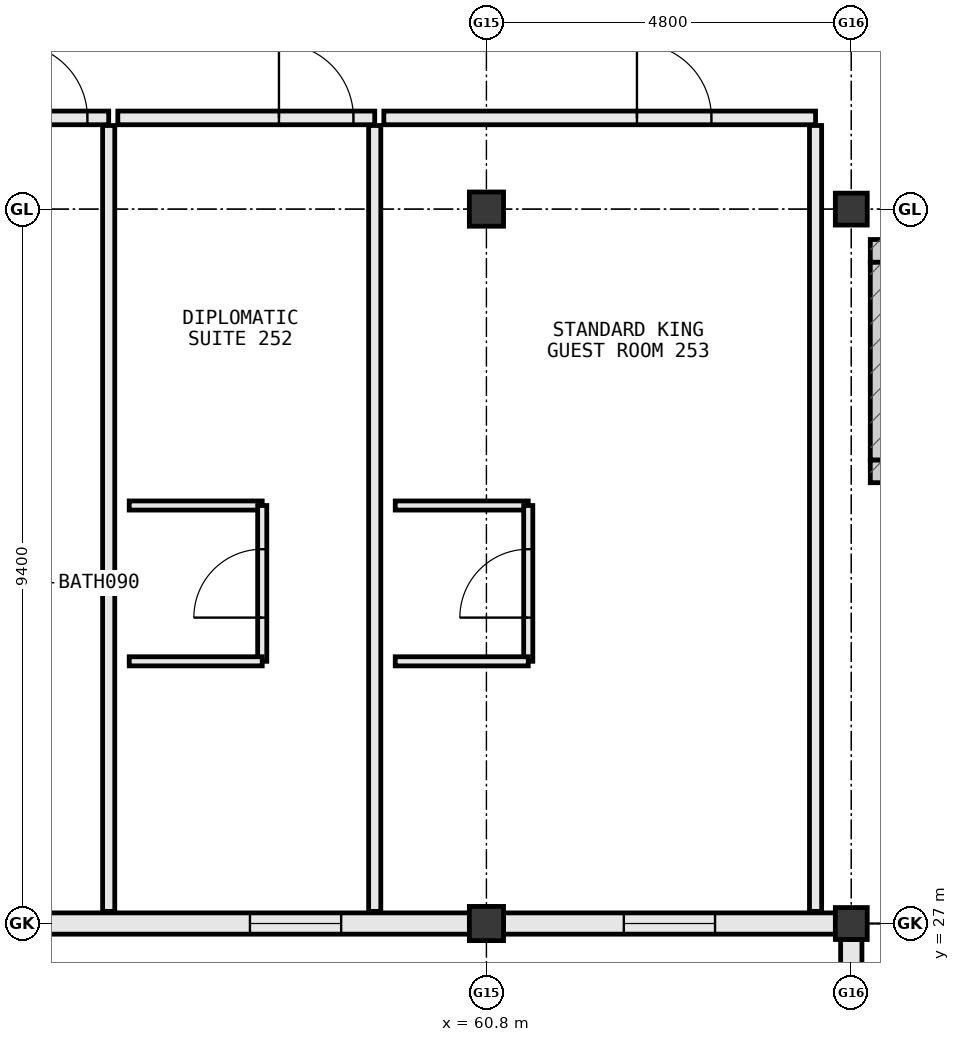
"""IFC4 building model, lengths in metres.
Left out: names, types, materials, properties, quantities, classifications, styles, units other than length and angle.
Written with IfcOpenShell. Run it as: python <this file> out.ifc"""

import sys

from ifc_helpers import new_model, si_unit, direction, frame, frame_2d, origin, origin_2d, place, context, subcontext, project, spatial, rectangle, extrude, element, fill, save


model = new_model("IFC4")
c1 = context("Model", 3, precision=1e-05, world=origin(), true_north=direction((0.0, 1.0)))
c2 = subcontext(c1, "Body", "Model", "MODEL_VIEW")
j1 = project(units=[si_unit("LENGTHUNIT", "METRE"), si_unit("PLANEANGLEUNIT", "RADIAN")], contexts=[c1])
p1 = place(None, origin())
s1 = spatial("IfcSite", under=j1, at=p1, CompositionType="ELEMENT")
p2 = place(p1, origin())
s2 = spatial("IfcBuilding", under=s1, at=p2, CompositionType="ELEMENT")
p3 = place(p2, frame((0.0, 0.0, 35.2)))
s3 = spatial("IfcBuildingStorey", under=s2, at=p3, CompositionType="ELEMENT", Elevation=35.2)
for number, where, z_axis, x_axis in (
    (1, (60.8, 27.0, 0.0), (0.0, 0.0, 1.0), (1.0, 0.0, 0.0)),
    (2, (60.8, 36.4, 0.0), (0.0, 0.0, 1.0), (1.0, 0.0, 0.0)),
):
    element("IfcColumn", number, at=place(p3, frame(where, z_axis=z_axis, x_axis=x_axis)), inside=s3, PredefinedType="COLUMN", context=c2, shape_type="SweptSolid", body=[
        extrude(rectangle(XDim=0.45, YDim=0.45, at=origin_2d()), origin(), (0.0, 0.0, 1.0), 3.8),
    ])
for number, where, z_axis, x_axis in (
    (3, (65.6, 27.0, 0.0), (0.0, 0.0, 1.0), (1.0, 0.0, 0.0)),
    (4, (65.6, 36.4, 0.0), (0.0, 0.0, 1.0), (1.0, 0.0, 0.0)),
):
    element("IfcColumn", number, at=place(p3, frame(where, z_axis=z_axis, x_axis=x_axis)), inside=s3, PredefinedType="COLUMN", context=c2, shape_type="SweptSolid", body=[
        extrude(rectangle(XDim=0.42, YDim=0.42, at=origin_2d()), origin(), (0.0, 0.0, 1.0), 3.8),
    ])
p4 = place(p3, frame((51.423, 27.0, 0.0), z_axis=(0.0, 0.0, 1.0), x_axis=(1.0, 0.0, 0.0)))
e5 = element("IfcWall", 5, at=p4, inside=s3, PredefinedType="STANDARD", context=c2, shape_type="SweptSolid", body=[
    extrude(rectangle(XDim=9.154, YDim=0.28, at=frame_2d((4.577, 0.0))), origin(), (0.0, 0.0, 1.0), 2.84),
])
p5 = place(p4, frame((1.688, 0.0, 0.85)))
e6 = element("IfcOpeningElement", 6, at=p5, cuts=e5, PredefinedType="OPENING", context=c2, shape_type="SweptSolid", body=[
    extrude(rectangle(XDim=1.2, YDim=1.55, at=frame_2d((0.6, 0.775))), frame((0.0, 0.152, 0.0), z_axis=(0.0, -1.0, 0.0), x_axis=(1.0, 0.0, 0.0)), (0.0, 0.0, 1.0), 0.304),
])
p6 = place(p4, frame((6.265, 0.0, 0.85)))
e7 = element("IfcOpeningElement", 7, at=p6, cuts=e5, PredefinedType="OPENING", context=c2, shape_type="SweptSolid", body=[
    extrude(rectangle(XDim=1.2, YDim=1.55, at=frame_2d((0.6, 0.775))), frame((0.0, 0.152, 0.0), z_axis=(0.0, -1.0, 0.0), x_axis=(1.0, 0.0, 0.0)), (0.0, 0.0, 1.0), 0.304),
])
p7 = place(p3, frame((61.023, 27.0, 0.0), z_axis=(0.0, 0.0, 1.0), x_axis=(1.0, 0.0, 0.0)))
e8 = element("IfcWall", 8, at=p7, inside=s3, PredefinedType="STANDARD", context=c2, shape_type="SweptSolid", body=[
    extrude(rectangle(XDim=4.369, YDim=0.28, at=frame_2d((2.185, 0.0))), origin(), (0.0, 0.0, 1.0), 3.02),
])
p8 = place(p7, frame((1.584, 0.0, 0.85)))
e9 = element("IfcOpeningElement", 9, at=p8, cuts=e8, PredefinedType="OPENING", context=c2, shape_type="SweptSolid", body=[
    extrude(rectangle(XDim=1.2, YDim=1.55, at=frame_2d((0.6, 0.775))), frame((0.0, 0.152, 0.0), z_axis=(0.0, -1.0, 0.0), x_axis=(1.0, 0.0, 0.0)), (0.0, 0.0, 1.0), 0.304),
])
p9 = place(p3, frame((65.6, 26.792, 0.0), z_axis=(0.0, 0.0, 1.0), x_axis=(0.0, -1.0, 0.0)))
e10 = element("IfcWall", 10, at=p9, inside=s3, PredefinedType="STANDARD", context=c2, shape_type="SweptSolid", body=[
    extrude(rectangle(XDim=7.984, YDim=0.28, at=frame_2d((3.992, 0.0))), origin(), (0.0, 0.0, 1.0), 3.02),
])
p10 = place(p9, frame((3.467, 0.0, 0.85)))
e11 = element("IfcOpeningElement", 11, at=p10, cuts=e10, PredefinedType="OPENING", context=c2, shape_type="SweptSolid", body=[
    extrude(rectangle(XDim=1.05, YDim=1.45, at=frame_2d((0.525, 0.725))), frame((0.0, 0.152, 0.0), z_axis=(0.0, -1.0, 0.0), x_axis=(1.0, 0.0, 0.0)), (0.0, 0.0, 1.0), 0.304),
])
p11 = place(p3, frame((65.85, 32.95, 0.0), z_axis=(0.0, 0.0, 1.0), x_axis=(1.0, 0.0, 0.0)))
e12 = element("IfcWall", 12, at=p11, inside=s3, PredefinedType="SHEAR", context=c2, shape_type="SweptSolid", body=[
    extrude(rectangle(XDim=2.9, YDim=0.3, at=frame_2d((1.45, 0.0))), origin(), (0.0, 0.0, 1.0), 3.8),
])
p12 = place(p11, frame((0.85, 0.0, 0.0)))
e13 = element("IfcOpeningElement", 13, at=p12, cuts=e12, PredefinedType="OPENING", context=c2, shape_type="SweptSolid", body=[
    extrude(rectangle(XDim=1.2, YDim=2.2, at=frame_2d((0.6, 1.1))), frame((0.0, 0.162, 0.0), z_axis=(0.0, -1.0, 0.0), x_axis=(1.0, 0.0, 0.0)), (0.0, 0.0, 1.0), 0.324),
])
p13 = place(p3, frame((68.75, 35.85, 0.0), z_axis=(0.0, 0.0, 1.0), x_axis=(-1.0, 0.0, 0.0)))
e14 = element("IfcWall", 14, at=p13, inside=s3, PredefinedType="SHEAR", context=c2, shape_type="SweptSolid", body=[
    extrude(rectangle(XDim=2.9, YDim=0.3, at=frame_2d((1.45, 0.0))), origin(), (0.0, 0.0, 1.0), 3.8),
])
p14 = place(p3, frame((66.0, 35.7, 0.0), z_axis=(0.0, 0.0, 1.0), x_axis=(0.0, -1.0, 0.0)))
e15 = element("IfcWall", 15, at=p14, inside=s3, PredefinedType="SHEAR", context=c2, shape_type="SweptSolid", body=[
    extrude(rectangle(XDim=2.6, YDim=0.3, at=frame_2d((1.3, 0.0))), origin(), (0.0, 0.0, 1.0), 3.8),
])
p15 = place(p3, frame((55.83, 37.6, 0.0), z_axis=(0.0, 0.0, 1.0), x_axis=(-1.0, 0.0, 0.0)))
e16 = element("IfcWall", 16, at=p15, inside=s3, PredefinedType="PARTITIONING", context=c2, shape_type="SweptSolid", body=[
    extrude(rectangle(XDim=3.38, YDim=0.18, at=frame_2d((1.69, 0.0))), origin(), (0.0, 0.0, 1.0), 3.565),
])
p16 = place(p15, frame((0.28, 0.0, 0.0)))
e17 = element("IfcOpeningElement", 17, at=p16, cuts=e16, PredefinedType="OPENING", context=c2, shape_type="SweptSolid", body=[
    extrude(rectangle(XDim=0.98, YDim=2.18, at=frame_2d((0.49, 1.09))), frame((0.0, 0.102, 0.0), z_axis=(0.0, -1.0, 0.0), x_axis=(1.0, 0.0, 0.0)), (0.0, 0.0, 1.0), 0.204),
])
p17 = place(p3, frame((55.83, 27.16, 0.0), z_axis=(0.0, 0.0, 1.0), x_axis=(0.0, 1.0, 0.0)))
e18 = element("IfcWall", 18, at=p17, inside=s3, PredefinedType="PARTITIONING", context=c2, shape_type="SweptSolid", body=[
    extrude(rectangle(XDim=10.34, YDim=0.16, at=frame_2d((5.17, 0.0))), origin(), (0.0, 0.0, 1.0), 3.565),
])
p18 = place(p3, frame((59.33, 37.6, 0.0), z_axis=(0.0, 0.0, 1.0), x_axis=(-1.0, 0.0, 0.0)))
e19 = element("IfcWall", 19, at=p18, inside=s3, PredefinedType="PARTITIONING", context=c2, shape_type="SweptSolid", body=[
    extrude(rectangle(XDim=3.38, YDim=0.18, at=frame_2d((1.69, 0.0))), origin(), (0.0, 0.0, 1.0), 3.565),
])
p19 = place(p18, frame((0.28, 0.0, 0.0)))
e20 = element("IfcOpeningElement", 20, at=p19, cuts=e19, PredefinedType="OPENING", context=c2, shape_type="SweptSolid", body=[
    extrude(rectangle(XDim=0.98, YDim=2.18, at=frame_2d((0.49, 1.09))), frame((0.0, 0.102, 0.0), z_axis=(0.0, -1.0, 0.0), x_axis=(1.0, 0.0, 0.0)), (0.0, 0.0, 1.0), 0.204),
])
p20 = place(p3, frame((59.33, 27.16, 0.0), z_axis=(0.0, 0.0, 1.0), x_axis=(0.0, 1.0, 0.0)))
e21 = element("IfcWall", 21, at=p20, inside=s3, PredefinedType="PARTITIONING", context=c2, shape_type="SweptSolid", body=[
    extrude(rectangle(XDim=10.34, YDim=0.16, at=frame_2d((5.17, 0.0))), origin(), (0.0, 0.0, 1.0), 3.565),
])
p21 = place(p3, frame((56.1, 32.5, 0.0), z_axis=(0.0, 0.0, 1.0), x_axis=(1.0, 0.0, 0.0)))
e22 = element("IfcWall", 22, at=p21, inside=s3, PredefinedType="PARTITIONING", context=c2, shape_type="SweptSolid", body=[
    extrude(rectangle(XDim=1.75, YDim=0.12, at=frame_2d((0.875, 0.0))), origin(), (0.0, 0.0, 1.0), 3.565),
])
p22 = place(p3, frame((57.85, 30.45, 0.0), z_axis=(0.0, 0.0, 1.0), x_axis=(0.0, 1.0, 0.0)))
e23 = element("IfcWall", 23, at=p22, inside=s3, PredefinedType="PARTITIONING", context=c2, shape_type="SweptSolid", body=[
    extrude(rectangle(XDim=2.05, YDim=0.12, at=frame_2d((1.025, 0.0))), origin(), (0.0, 0.0, 1.0), 3.11),
])
p23 = place(p22, frame((0.575, 0.0, 0.0)))
e24 = element("IfcOpeningElement", 24, at=p23, cuts=e23, PredefinedType="OPENING", context=c2, shape_type="SweptSolid", body=[
    extrude(rectangle(XDim=0.9, YDim=2.15, at=frame_2d((0.45, 1.075))), frame((0.0, 0.072, 0.0), z_axis=(0.0, -1.0, 0.0), x_axis=(1.0, 0.0, 0.0)), (0.0, 0.0, 1.0), 0.144),
])
p24 = place(p3, frame((56.1, 30.45, 0.0), z_axis=(0.0, 0.0, 1.0), x_axis=(1.0, 0.0, 0.0)))
e25 = element("IfcWall", 25, at=p24, inside=s3, PredefinedType="PARTITIONING", context=c2, shape_type="SweptSolid", body=[
    extrude(rectangle(XDim=1.75, YDim=0.12, at=frame_2d((0.875, 0.0))), origin(), (0.0, 0.0, 1.0), 3.565),
])
p25 = place(p3, frame((65.13, 37.6, 0.0), z_axis=(0.0, 0.0, 1.0), x_axis=(-1.0, 0.0, 0.0)))
e26 = element("IfcWall", 26, at=p25, inside=s3, PredefinedType="PARTITIONING", context=c2, shape_type="SweptSolid", body=[
    extrude(rectangle(XDim=5.68, YDim=0.18, at=frame_2d((2.84, 0.0))), origin(), (0.0, 0.0, 1.0), 3.565),
])
p26 = place(p25, frame((1.37, 0.0, 0.0)))
e27 = element("IfcOpeningElement", 27, at=p26, cuts=e26, PredefinedType="OPENING", context=c2, shape_type="SweptSolid", body=[
    extrude(rectangle(XDim=0.98, YDim=2.18, at=frame_2d((0.49, 1.09))), frame((0.0, 0.102, 0.0), z_axis=(0.0, -1.0, 0.0), x_axis=(1.0, 0.0, 0.0)), (0.0, 0.0, 1.0), 0.204),
])
p27 = place(p3, frame((65.13, 27.16, 0.0), z_axis=(0.0, 0.0, 1.0), x_axis=(0.0, 1.0, 0.0)))
e28 = element("IfcWall", 28, at=p27, inside=s3, PredefinedType="PARTITIONING", context=c2, shape_type="SweptSolid", body=[
    extrude(rectangle(XDim=10.34, YDim=0.16, at=frame_2d((5.17, 0.0))), origin(), (0.0, 0.0, 1.0), 3.565),
])
p28 = place(p3, frame((59.6, 32.5, 0.0), z_axis=(0.0, 0.0, 1.0), x_axis=(1.0, 0.0, 0.0)))
e29 = element("IfcWall", 29, at=p28, inside=s3, PredefinedType="PARTITIONING", context=c2, shape_type="SweptSolid", body=[
    extrude(rectangle(XDim=1.75, YDim=0.12, at=frame_2d((0.875, 0.0))), origin(), (0.0, 0.0, 1.0), 3.565),
])
p29 = place(p3, frame((61.35, 30.45, 0.0), z_axis=(0.0, 0.0, 1.0), x_axis=(0.0, 1.0, 0.0)))
e30 = element("IfcWall", 30, at=p29, inside=s3, PredefinedType="PARTITIONING", context=c2, shape_type="SweptSolid", body=[
    extrude(rectangle(XDim=2.05, YDim=0.12, at=frame_2d((1.025, 0.0))), origin(), (0.0, 0.0, 1.0), 3.565),
])
p30 = place(p29, frame((0.575, 0.0, 0.0)))
e31 = element("IfcOpeningElement", 31, at=p30, cuts=e30, PredefinedType="OPENING", context=c2, shape_type="SweptSolid", body=[
    extrude(rectangle(XDim=0.9, YDim=2.15, at=frame_2d((0.45, 1.075))), frame((0.0, 0.072, 0.0), z_axis=(0.0, -1.0, 0.0), x_axis=(1.0, 0.0, 0.0)), (0.0, 0.0, 1.0), 0.144),
])
p31 = place(p3, frame((59.6, 30.45, 0.0), z_axis=(0.0, 0.0, 1.0), x_axis=(1.0, 0.0, 0.0)))
e32 = element("IfcWall", 32, at=p31, inside=s3, PredefinedType="PARTITIONING", context=c2, shape_type="SweptSolid", body=[
    extrude(rectangle(XDim=1.75, YDim=0.12, at=frame_2d((0.875, 0.0))), origin(), (0.0, 0.0, 1.0), 3.565),
])
p32 = place(p6, origin())
e33 = element("IfcWindow", 33, at=p32, inside=s3, PartitioningType="SINGLE_PANEL", PredefinedType="WINDOW", context=c2, shape_type="SweptSolid", body=[
    extrude(rectangle(XDim=1.2, YDim=1.55, at=frame_2d((0.6, 0.775))), frame((0.0, 0.03, 0.0), z_axis=(0.0, -1.0, 0.0), x_axis=(1.0, 0.0, 0.0)), (0.0, 0.0, 1.0), 0.06),
])
fill(e7, e33)
p33 = place(p8, origin())
e34 = element("IfcWindow", 34, at=p33, inside=s3, PartitioningType="SINGLE_PANEL", PredefinedType="WINDOW", context=c2, shape_type="SweptSolid", body=[
    extrude(rectangle(XDim=1.2, YDim=1.55, at=frame_2d((0.6, 0.775))), frame((0.0, 0.03, 0.0), z_axis=(0.0, -1.0, 0.0), x_axis=(1.0, 0.0, 0.0)), (0.0, 0.0, 1.0), 0.06),
])
fill(e9, e34)
p34 = place(p16, frame((0.98, 0.0, 0.0), z_axis=(0.0, 0.0, 1.0), x_axis=(-1.0, 0.0, 0.0)))
e35 = element("IfcDoor", 35, at=p34, inside=s3, OperationType="SINGLE_SWING_RIGHT", PredefinedType="DOOR", context=c2, shape_type="SweptSolid", body=[
    extrude(rectangle(XDim=0.98, YDim=2.18, at=frame_2d((0.49, 1.09))), frame((0.0, 0.025, 0.0), z_axis=(0.0, -1.0, 0.0), x_axis=(1.0, 0.0, 0.0)), (0.0, 0.0, 1.0), 0.05),
])
fill(e17, e35)
p35 = place(p19, frame((0.98, 0.0, 0.0), z_axis=(0.0, 0.0, 1.0), x_axis=(-1.0, 0.0, 0.0)))
e36 = element("IfcDoor", 36, at=p35, inside=s3, OperationType="SINGLE_SWING_RIGHT", PredefinedType="DOOR", context=c2, shape_type="SweptSolid", body=[
    extrude(rectangle(XDim=0.98, YDim=2.18, at=frame_2d((0.49, 1.09))), frame((0.0, 0.025, 0.0), z_axis=(0.0, -1.0, 0.0), x_axis=(1.0, 0.0, 0.0)), (0.0, 0.0, 1.0), 0.05),
])
fill(e20, e36)
p36 = place(p23, origin())
e37 = element("IfcDoor", 37, at=p36, inside=s3, OperationType="SINGLE_SWING_LEFT", PredefinedType="DOOR", context=c2, shape_type="SweptSolid", body=[
    extrude(rectangle(XDim=0.9, YDim=2.15, at=frame_2d((0.45, 1.075))), frame((0.0, 0.025, 0.0), z_axis=(0.0, -1.0, 0.0), x_axis=(1.0, 0.0, 0.0)), (0.0, 0.0, 1.0), 0.05),
])
fill(e24, e37)
p37 = place(p26, frame((0.98, 0.0, 0.0), z_axis=(0.0, 0.0, 1.0), x_axis=(-1.0, 0.0, 0.0)))
e38 = element("IfcDoor", 38, at=p37, inside=s3, OperationType="SINGLE_SWING_RIGHT", PredefinedType="DOOR", context=c2, shape_type="SweptSolid", body=[
    extrude(rectangle(XDim=0.98, YDim=2.18, at=frame_2d((0.49, 1.09))), frame((0.0, 0.025, 0.0), z_axis=(0.0, -1.0, 0.0), x_axis=(1.0, 0.0, 0.0)), (0.0, 0.0, 1.0), 0.05),
])
fill(e27, e38)
p38 = place(p30, origin())
e39 = element("IfcDoor", 39, at=p38, inside=s3, OperationType="SINGLE_SWING_LEFT", PredefinedType="DOOR", context=c2, shape_type="SweptSolid", body=[
    extrude(rectangle(XDim=0.9, YDim=2.15, at=frame_2d((0.45, 1.075))), frame((0.0, 0.025, 0.0), z_axis=(0.0, -1.0, 0.0), x_axis=(1.0, 0.0, 0.0)), (0.0, 0.0, 1.0), 0.05),
])
fill(e31, e39)
save(model, sys.argv[1])
